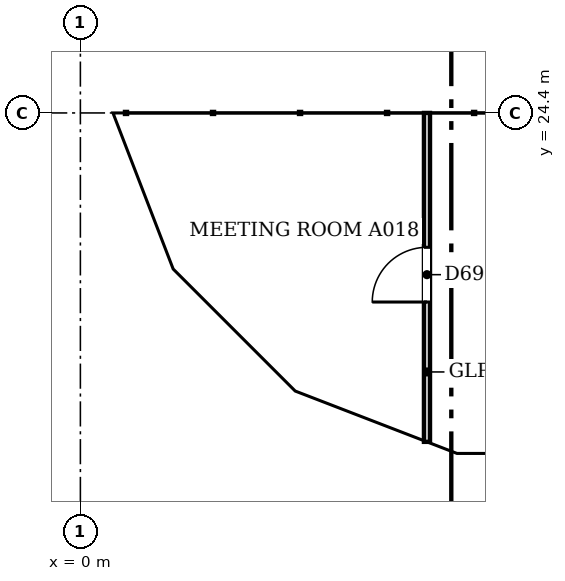
"""IFC4 building model, lengths in metres.
Left out: names, types, materials, properties, quantities, classifications, styles, units other than length and angle.
Written with IfcOpenShell. Run it as: python <this file> out.ifc"""

import sys

from ifc_helpers import new_model, si_unit, direction, frame, frame_2d, origin, place, context, subcontext, project, spatial, polyline, rectangle, outline, extrude, faceted_brep, source, transform, mapped, element, fill, save


model = new_model("IFC4")
c1 = context("Model", 3, precision=1e-05, world=origin(), true_north=direction((0.0, 1.0)))
c2 = subcontext(c1, "Body", "Model", "MODEL_VIEW")
j1 = project(units=[si_unit("LENGTHUNIT", "METRE"), si_unit("PLANEANGLEUNIT", "RADIAN")], contexts=[c1])
p1 = place(None, origin())
s1 = spatial("IfcSite", under=j1, at=p1, CompositionType="ELEMENT")
p2 = place(p1, origin())
s2 = spatial("IfcBuilding", under=s1, at=p2, CompositionType="ELEMENT")
p3 = place(p2, frame((0.0, 0.0, 116.4)))
s3 = spatial("IfcBuildingStorey", under=s2, at=p3, CompositionType="ELEMENT", Elevation=116.4)
m1 = source(origin(), c2, "Body", "Brep", [
    faceted_brep([(3.003, -0.25, 0.0), (3.05, -0.25, 0.06), (3.05, -0.25, 7.54), (3.003, -0.25, 7.6), (0.0, -0.25, 3.8), (0.0, 0.25, 3.8), (2.957, 0.25, 7.541), (2.957, 0.25, 0.059), (3.003, 0.0, 0.0), (3.003, 0.0, 7.6)], [[[0, 1, 2, 3, 4]], [[5, 6, 7]], [[1, 0, 8]], [[9, 3, 2]], [[6, 5, 4, 3, 9]], [[5, 7, 8, 0, 4]], [[1, 8, 7, 6, 9, 2]]]),
])
p4 = place(p3, frame((0.25, 27.45, -3.8), z_axis=(0.0, 0.0, 1.0), x_axis=(0.0, -1.0, 0.0)))
e1 = element("IfcWall", 1, at=p4, inside=s3, PredefinedType="SOLIDWALL", context=c2, shape_type="MappedRepresentation", body=[
    mapped(m1, transform((0.0, 0.0, 0.0), scale=1.0)),
])
m2 = source(origin(), c2, "Body", "SweptSolid", [
    extrude(outline(polyline([(2.803, 6.944), (0.319, 3.8), (2.803, 0.656), (2.803, 6.944)])), frame((0.0, 0.26, 0.0), z_axis=(0.0, -1.0, 0.0), x_axis=(1.0, 0.0, 0.0)), (0.0, 0.0, 1.0), 0.52),
])
p5 = place(p4, origin())
e2 = element("IfcOpeningElement", 2, at=p5, cuts=e1, PredefinedType="OPENING", context=c2, shape_type="MappedRepresentation", body=[
    mapped(m2, transform((0.0, 0.0, 0.0), scale=1.0)),
])
m3 = source(origin(), c2, "Body", "Brep", [
    faceted_brep([(0.047, -0.25, 0.0), (2.997, -0.25, 3.8), (0.047, -0.25, 7.6), (0.0, -0.25, 7.541), (0.0, -0.25, 0.059), (0.093, 0.25, 7.54), (2.944, 0.25, 3.868), (2.944, 0.25, 3.732), (0.093, 0.25, 0.06), (2.997, 0.0, 3.8), (0.047, 0.0, 0.0), (0.047, 0.0, 7.6)], [[[0, 1, 2, 3, 4]], [[5, 6, 7, 8]], [[8, 7, 9, 1, 0, 10]], [[6, 5, 11, 2, 1, 9]], [[3, 2, 11]], [[10, 0, 4]], [[8, 10, 4, 3, 11, 5]], [[9, 7, 6]]]),
])
p6 = place(p3, frame((0.233, 24.49, -3.8), z_axis=(0.0, 0.0, 1.0), x_axis=(0.359901446078, -0.932990326376, 0.0)))
e3 = element("IfcWall", 3, at=p6, inside=s3, PredefinedType="SOLIDWALL", context=c2, shape_type="MappedRepresentation", body=[
    mapped(m3, transform((0.0, 0.0, 0.0), scale=1.0)),
])
m4 = source(origin(), c2, "Body", "SweptSolid", [
    extrude(outline(polyline([(0.247, 0.665), (2.681, 3.8), (0.247, 6.935), (0.247, 0.665)])), frame((0.0, 0.26, 0.0), z_axis=(0.0, -1.0, 0.0), x_axis=(1.0, 0.0, 0.0)), (0.0, 0.0, 1.0), 0.52),
])
p7 = place(p6, origin())
e4 = element("IfcOpeningElement", 4, at=p7, cuts=e3, PredefinedType="OPENING", context=c2, shape_type="MappedRepresentation", body=[
    mapped(m4, transform((0.0, 0.0, 0.0), scale=1.0)),
])
m5 = source(origin(), c2, "Body", "Brep", [
    faceted_brep([(2.944, -0.25, 0.0), (2.997, -0.25, 0.068), (2.997, -0.25, 7.532), (2.944, -0.25, 7.6), (0.0, -0.25, 3.8), (0.053, 0.25, 3.868), (2.891, 0.25, 7.532), (2.891, 0.25, 0.068), (0.053, 0.25, 3.731), (2.944, 0.0, 0.0), (2.944, 0.0, 7.6), (0.0, 0.0, 3.8)], [[[0, 1, 2, 3, 4]], [[5, 6, 7, 8]], [[1, 0, 9]], [[10, 3, 2]], [[6, 5, 11, 4, 3, 10]], [[8, 7, 9, 0, 4, 11]], [[8, 11, 5]], [[1, 9, 7, 6, 10, 2]]]),
])
p8 = place(p3, frame((1.312, 21.694, -3.8), z_axis=(0.0, 0.0, 1.0), x_axis=(0.707066050402, -0.707147509625, 0.0)))
e5 = element("IfcWall", 5, at=p8, inside=s3, PredefinedType="SOLIDWALL", context=c2, shape_type="MappedRepresentation", body=[
    mapped(m5, transform((0.0, 0.0, 0.0), scale=1.0)),
])
m6 = source(origin(), c2, "Body", "SweptSolid", [
    extrude(outline(polyline([(2.744, 6.934), (0.316, 3.8), (2.744, 0.666), (2.744, 6.934)])), frame((0.0, 0.26, 0.0), z_axis=(0.0, -1.0, 0.0), x_axis=(1.0, 0.0, 0.0)), (0.0, 0.0, 1.0), 0.52),
])
p9 = place(p8, origin())
e6 = element("IfcOpeningElement", 6, at=p9, cuts=e5, PredefinedType="OPENING", context=c2, shape_type="MappedRepresentation", body=[
    mapped(m6, transform((0.0, 0.0, 0.0), scale=1.0)),
])
m7 = source(origin(), c2, "Body", "Brep", [
    faceted_brep([(0.053, -0.25, 0.0), (3.003, -0.25, 3.8), (0.053, -0.25, 7.6), (0.0, -0.25, 7.531), (0.0, -0.25, 0.068), (0.106, 0.25, 7.532), (2.957, 0.25, 3.86), (2.957, 0.25, 3.74), (0.106, 0.25, 0.068), (3.003, 0.0, 3.8), (0.053, 0.0, 0.0), (0.053, 0.0, 7.6)], [[[0, 1, 2, 3, 4]], [[5, 6, 7, 8]], [[8, 7, 9, 1, 0, 10]], [[6, 5, 11, 2, 1, 9]], [[3, 2, 11]], [[10, 0, 4]], [[8, 10, 4, 3, 11, 5]], [[9, 7, 6]]]),
])
p10 = place(p3, frame((3.344, 19.631, -3.8), z_axis=(0.0, 0.0, 1.0), x_axis=(0.933007896601, -0.359855894603, 0.0)))
e7 = element("IfcWall", 7, at=p10, inside=s3, PredefinedType="SOLIDWALL", context=c2, shape_type="MappedRepresentation", body=[
    mapped(m7, transform((0.0, 0.0, 0.0), scale=1.0)),
])
m8 = source(origin(), c2, "Body", "SweptSolid", [
    extrude(outline(polyline([(0.253, 0.665), (2.687, 3.8), (0.253, 6.935), (0.253, 0.665)])), frame((0.0, 0.26, 0.0), z_axis=(0.0, -1.0, 0.0), x_axis=(1.0, 0.0, 0.0)), (0.0, 0.0, 1.0), 0.52),
])
p11 = place(p10, origin())
e8 = element("IfcOpeningElement", 8, at=p11, cuts=e7, PredefinedType="OPENING", context=c2, shape_type="MappedRepresentation", body=[
    mapped(m8, transform((0.0, 0.0, 0.0), scale=1.0)),
])
m9 = source(origin(), c2, "Body", "Brep", [
    faceted_brep([(3.003, -0.25, 0.0), (6.053, -0.25, 3.8), (3.003, -0.25, 7.6), (0.0, -0.25, 3.8), (0.047, 0.25, 3.859), (3.003, 0.25, 7.6), (6.053, 0.25, 3.8), (3.003, 0.25, 0.0), (0.047, 0.25, 3.741), (0.0, 0.0, 3.8)], [[[0, 1, 2, 3]], [[4, 5, 6, 7, 8]], [[7, 6, 1, 0]], [[6, 5, 2, 1]], [[5, 4, 9, 3, 2]], [[8, 7, 0, 3, 9]], [[8, 9, 4]]]),
])
p12 = place(p3, frame((6.146, 18.55, -3.8), z_axis=(0.0, 0.0, 1.0), x_axis=(1.0, 0.0, 0.0)))
e9 = element("IfcWall", 9, at=p12, inside=s3, PredefinedType="SOLIDWALL", context=c2, shape_type="MappedRepresentation", body=[
    mapped(m9, transform((0.0, 0.0, 0.0), scale=1.0)),
])
m10 = source(origin(), c2, "Body", "SweptSolid", [
    extrude(outline(polyline([(3.005, 0.401), (5.733, 3.8), (3.005, 7.199), (0.319, 3.8), (3.005, 0.401)])), frame((0.0, 0.26, 0.0), z_axis=(0.0, -1.0, 0.0), x_axis=(1.0, 0.0, 0.0)), (0.0, 0.0, 1.0), 0.52),
])
p13 = place(p12, origin())
e10 = element("IfcOpeningElement", 10, at=p13, cuts=e9, PredefinedType="OPENING", context=c2, shape_type="MappedRepresentation", body=[
    mapped(m10, transform((0.0, 0.0, 0.0), scale=1.0)),
])
p14 = place(p2, frame((0.0, 0.0, 120.2)))
s4 = spatial("IfcBuildingStorey", under=s2, at=p14, CompositionType="ELEMENT", Elevation=120.2)
m11 = source(origin(), c2, "Body", "Brep", [
    faceted_brep([(3.05, -0.25, 0.0), (6.053, -0.25, 3.8), (3.05, -0.25, 7.6), (0.0, -0.25, 3.8), (0.0, 0.25, 3.8), (3.05, 0.25, 7.6), (6.007, 0.25, 3.859), (6.007, 0.25, 3.741), (3.05, 0.25, 0.0), (6.053, 0.0, 3.8)], [[[0, 1, 2, 3]], [[4, 5, 6, 7, 8]], [[8, 7, 9, 1, 0]], [[6, 5, 2, 1, 9]], [[5, 4, 3, 2]], [[4, 8, 0, 3]], [[9, 7, 6]]]),
])
p15 = place(p14, frame((0.25, 30.5, -3.8), z_axis=(0.0, 0.0, 1.0), x_axis=(0.0, -1.0, 0.0)))
e11 = element("IfcWall", 11, at=p15, inside=s4, PredefinedType="SOLIDWALL", context=c2, shape_type="MappedRepresentation", body=[
    mapped(m11, transform((0.0, 0.0, 0.0), scale=1.0)),
])
m12 = source(origin(), c2, "Body", "SweptSolid", [
    extrude(outline(polyline([(3.049, 0.401), (5.735, 3.8), (3.049, 7.199), (0.321, 3.8), (3.049, 0.401)])), frame((0.0, 0.26, 0.0), z_axis=(0.0, -1.0, 0.0), x_axis=(1.0, 0.0, 0.0)), (0.0, 0.0, 1.0), 0.52),
])
p16 = place(p15, origin())
e12 = element("IfcOpeningElement", 12, at=p16, cuts=e11, PredefinedType="OPENING", context=c2, shape_type="MappedRepresentation", body=[
    mapped(m12, transform((0.0, 0.0, 0.0), scale=1.0)),
])
m13 = source(origin(), c2, "Body", "Brep", [
    faceted_brep([(2.95, -0.25, 0.0), (3.003, -0.25, 0.068), (3.003, -0.25, 7.532), (2.95, -0.25, 7.6), (0.0, -0.25, 3.8), (0.047, 0.25, 3.86), (2.898, 0.25, 7.532), (2.898, 0.25, 0.068), (0.047, 0.25, 3.74), (2.95, 0.0, 0.0), (2.95, 0.0, 7.6), (0.0, 0.0, 3.8)], [[[0, 1, 2, 3, 4]], [[5, 6, 7, 8]], [[1, 0, 9]], [[10, 3, 2]], [[6, 5, 11, 4, 3, 10]], [[8, 7, 9, 0, 4, 11]], [[8, 11, 5]], [[1, 9, 7, 6, 10, 2]]]),
])
p17 = place(p14, frame((0.25, 24.447, -3.8), z_axis=(0.0, 0.0, 1.0), x_axis=(0.35992665181, -0.932980602862, 0.0)))
e13 = element("IfcWall", 13, at=p17, inside=s4, PredefinedType="SOLIDWALL", context=c2, shape_type="MappedRepresentation", body=[
    mapped(m13, transform((0.0, 0.0, 0.0), scale=1.0)),
])
m14 = source(origin(), c2, "Body", "SweptSolid", [
    extrude(outline(polyline([(2.75, 6.935), (0.316, 3.8), (2.75, 0.665), (2.75, 6.935)])), frame((0.0, 0.26, 0.0), z_axis=(0.0, -1.0, 0.0), x_axis=(1.0, 0.0, 0.0)), (0.0, 0.0, 1.0), 0.52),
])
p18 = place(p17, origin())
e14 = element("IfcOpeningElement", 14, at=p18, cuts=e13, PredefinedType="OPENING", context=c2, shape_type="MappedRepresentation", body=[
    mapped(m14, transform((0.0, 0.0, 0.0), scale=1.0)),
])
m15 = source(origin(), c2, "Body", "Brep", [
    faceted_brep([(0.053, -0.25, 0.0), (2.997, -0.25, 3.8), (0.053, -0.25, 7.6), (0.0, -0.25, 7.532), (0.0, -0.25, 0.068), (0.106, 0.25, 7.532), (2.944, 0.25, 3.868), (2.944, 0.25, 3.732), (0.106, 0.25, 0.068), (2.997, 0.0, 3.8), (0.053, 0.0, 0.0), (0.053, 0.0, 7.6)], [[[0, 1, 2, 3, 4]], [[5, 6, 7, 8]], [[8, 7, 9, 1, 0, 10]], [[6, 5, 11, 2, 1, 9]], [[3, 2, 11]], [[10, 0, 4]], [[8, 10, 4, 3, 11, 5]], [[9, 7, 6]]]),
])
p19 = place(p14, frame((1.274, 21.731, -3.8), z_axis=(0.0, 0.0, 1.0), x_axis=(0.707147509625, -0.707066050402, 0.0)))
e15 = element("IfcWall", 15, at=p19, inside=s4, PredefinedType="SOLIDWALL", context=c2, shape_type="MappedRepresentation", body=[
    mapped(m15, transform((0.0, 0.0, 0.0), scale=1.0)),
])
m16 = source(origin(), c2, "Body", "SweptSolid", [
    extrude(outline(polyline([(0.253, 0.667), (2.681, 3.8), (0.253, 6.934), (0.253, 0.667)])), frame((0.0, 0.26, 0.0), z_axis=(0.0, -1.0, 0.0), x_axis=(1.0, 0.0, 0.0)), (0.0, 0.0, 1.0), 0.52),
])
p20 = place(p19, origin())
e16 = element("IfcOpeningElement", 16, at=p20, cuts=e15, PredefinedType="OPENING", context=c2, shape_type="MappedRepresentation", body=[
    mapped(m16, transform((0.0, 0.0, 0.0), scale=1.0)),
])
m17 = source(origin(), c2, "Body", "Brep", [
    faceted_brep([(2.95, -0.25, 0.0), (2.997, -0.25, 0.059), (2.997, -0.25, 7.541), (2.95, -0.25, 7.6), (0.0, -0.25, 3.8), (0.053, 0.25, 3.868), (2.904, 0.25, 7.54), (2.904, 0.25, 0.06), (0.053, 0.25, 3.732), (2.95, 0.0, 0.0), (2.95, 0.0, 7.6), (0.0, 0.0, 3.8)], [[[0, 1, 2, 3, 4]], [[5, 6, 7, 8]], [[1, 0, 9]], [[10, 3, 2]], [[6, 5, 11, 4, 3, 10]], [[8, 7, 9, 0, 4, 11]], [[8, 11, 5]], [[1, 9, 7, 6, 10, 2]]]),
])
p21 = place(p14, frame((3.394, 19.612, -3.8), z_axis=(0.0, 0.0, 1.0), x_axis=(0.932990326376, -0.359901446078, 0.0)))
e17 = element("IfcWall", 17, at=p21, inside=s4, PredefinedType="SOLIDWALL", context=c2, shape_type="MappedRepresentation", body=[
    mapped(m17, transform((0.0, 0.0, 0.0), scale=1.0)),
])
p22 = place(p21, origin())
e18 = element("IfcOpeningElement", 18, at=p22, cuts=e17, PredefinedType="OPENING", context=c2, shape_type="MappedRepresentation", body=[
    mapped(m14, transform((0.0, 0.0, 0.0), scale=1.0)),
])
m18 = source(origin(), c2, "Body", "Brep", [
    faceted_brep([(0.047, -0.25, 0.0), (3.05, -0.25, 3.8), (0.047, -0.25, 7.6), (0.0, -0.25, 7.54), (0.0, -0.25, 0.06), (0.093, 0.25, 7.541), (3.05, 0.25, 3.8), (0.093, 0.25, 0.059), (0.047, 0.0, 0.0), (0.047, 0.0, 7.6)], [[[0, 1, 2, 3, 4]], [[5, 6, 7]], [[7, 6, 1, 0, 8]], [[6, 5, 9, 2, 1]], [[3, 2, 9]], [[8, 0, 4]], [[7, 8, 4, 3, 9, 5]]]),
])
p23 = place(p14, frame((6.1, 18.55, -3.8), z_axis=(0.0, 0.0, 1.0), x_axis=(1.0, 0.0, 0.0)))
e19 = element("IfcWall", 19, at=p23, inside=s4, PredefinedType="SOLIDWALL", context=c2, shape_type="MappedRepresentation", body=[
    mapped(m18, transform((0.0, 0.0, 0.0), scale=1.0)),
])
m19 = source(origin(), c2, "Body", "SweptSolid", [
    extrude(outline(polyline([(0.247, 0.656), (2.731, 3.8), (0.247, 6.944), (0.247, 0.656)])), frame((0.0, 0.26, 0.0), z_axis=(0.0, -1.0, 0.0), x_axis=(1.0, 0.0, 0.0)), (0.0, 0.0, 1.0), 0.52),
])
p24 = place(p23, origin())
e20 = element("IfcOpeningElement", 20, at=p24, cuts=e19, PredefinedType="OPENING", context=c2, shape_type="MappedRepresentation", body=[
    mapped(m19, transform((0.0, 0.0, 0.0), scale=1.0)),
])
p25 = place(p3, frame((5.7, 18.99, 0.0), z_axis=(0.0, 0.0, 1.0), x_axis=(0.0, 1.0, 0.0)))
e21 = element("IfcWall", 21, at=p25, inside=s3, PredefinedType="PARTITIONING", context=c2, shape_type="SweptSolid", body=[
    extrude(rectangle(XDim=5.41, YDim=0.1, at=frame_2d((2.705, 0.0))), origin(), (0.0, 0.0, 1.0), 3.067),
])
m20 = source(origin(), c2, "Body", "SweptSolid", [
    extrude(rectangle(XDim=0.9, YDim=2.1, at=frame_2d((0.45, 1.05))), frame((0.0, 0.06, 0.0), z_axis=(0.0, -1.0, 0.0), x_axis=(1.0, 0.0, 0.0)), (0.0, 0.0, 1.0), 0.12),
])
p26 = place(p25, frame((2.3, 0.0, 0.0)))
e22 = element("IfcOpeningElement", 22, at=p26, cuts=e21, PredefinedType="OPENING", context=c2, shape_type="MappedRepresentation", body=[
    mapped(m20, transform((0.0, 0.0, 0.0), scale=1.0)),
])
m21 = source(origin(), c2, "Body", "SweptSolid", [
    extrude(rectangle(XDim=0.9, YDim=2.1, at=frame_2d((0.45, 1.05))), frame((0.0, 0.025, 0.0), z_axis=(0.0, -1.0, 0.0), x_axis=(1.0, 0.0, 0.0)), (0.0, 0.0, 1.0), 0.05),
])
p27 = place(p26, origin())
e23 = element("IfcDoor", 23, at=p27, inside=s3, OperationType="SINGLE_SWING_LEFT", PredefinedType="DOOR", context=c2, shape_type="MappedRepresentation", body=[
    mapped(m21, transform((0.0, 0.0, 0.0), scale=1.0)),
])
fill(e22, e23)
save(model, sys.argv[1])
